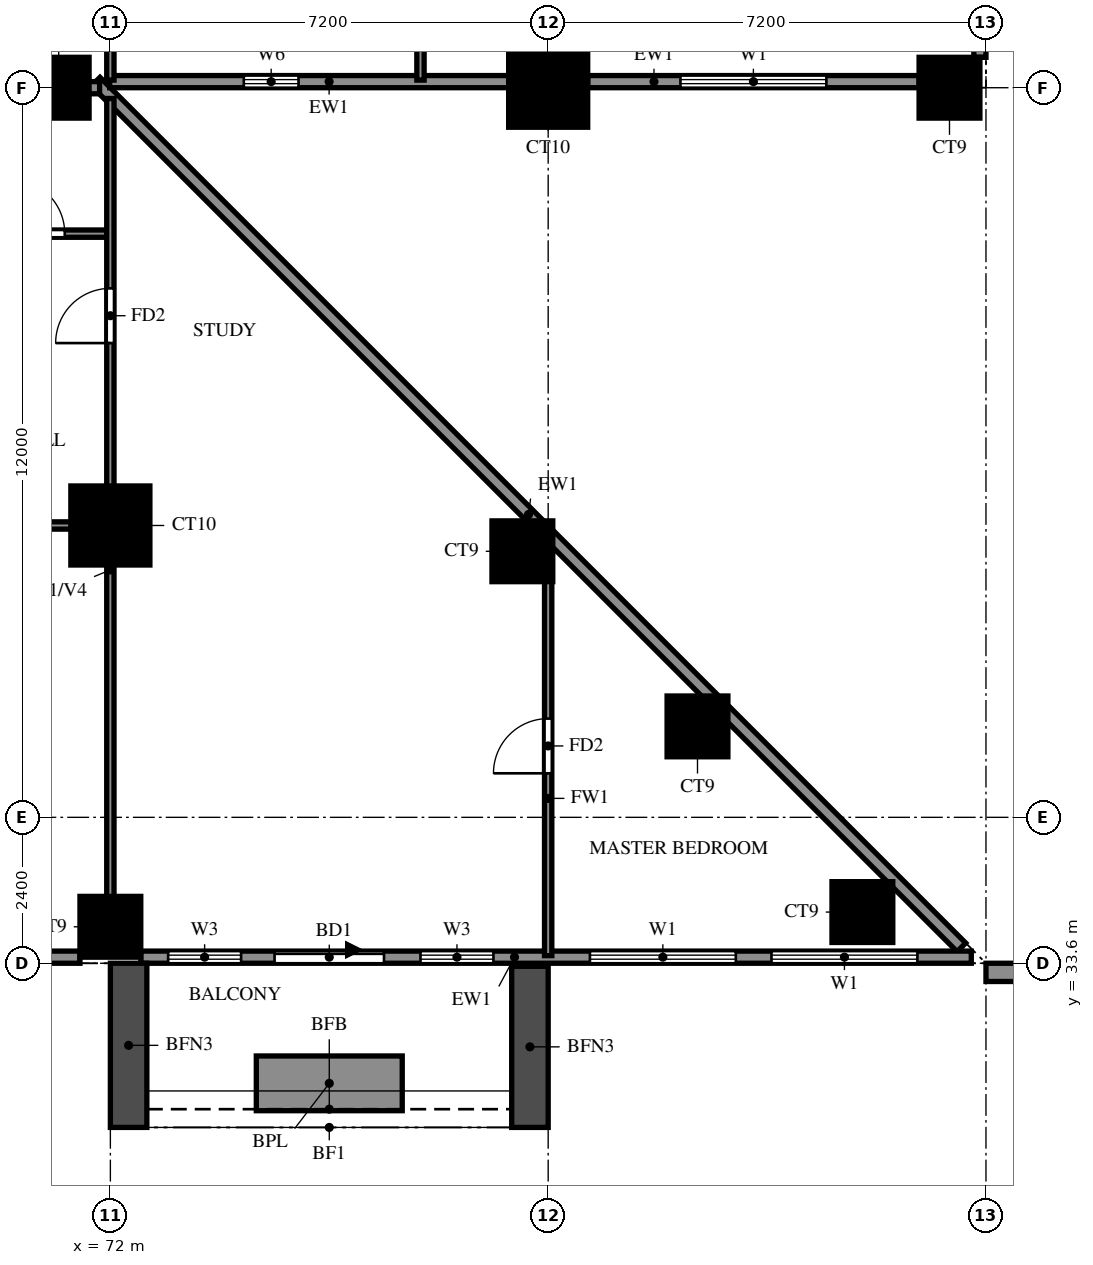
"""IFC4 building model, lengths in metres.
Left out: names, types, materials, properties, quantities, classifications, styles, units other than length and angle.
Written with IfcOpenShell. Run it as: python <this file> out.ifc"""

import sys

from ifc_helpers import new_model, si_unit, direction, frame, frame_2d, origin, origin_2d, place, context, subcontext, project, spatial, rectangle, extrude, source, transform, mapped, element, fill, save


model = new_model("IFC4")
c1 = context("Model", 3, precision=1e-05, world=origin(), true_north=direction((0.0, 1.0)))
c2 = subcontext(c1, "Body", "Model", "MODEL_VIEW")
j1 = project(units=[si_unit("LENGTHUNIT", "METRE"), si_unit("PLANEANGLEUNIT", "RADIAN")], contexts=[c1])
p1 = place(None, origin())
s1 = spatial("IfcSite", under=j1, at=p1, CompositionType="ELEMENT")
p2 = place(p1, origin())
s2 = spatial("IfcBuilding", under=s1, at=p2, CompositionType="ELEMENT")
p3 = place(p2, frame((0.0, 0.0, 83.0)))
s3 = spatial("IfcBuildingStorey", under=s2, at=p3, CompositionType="ELEMENT", Elevation=83.0)
m1 = source(origin(), c2, "Body", "SweptSolid", [
    extrude(rectangle(XDim=1.0, YDim=1.0, at=origin_2d()), origin(), (0.0, 0.0, 1.0), 3.18),
])
for number, where, z_axis, x_axis in (
    (1, (72.0, 34.2, 0.0), (0.0, 0.0, 1.0), (1.0, 0.0, 0.0)),
    (2, (84.367, 34.442, 0.0), (0.0, 0.0, 1.0), (1.0, 0.0, 0.0)),
    (3, (81.656, 37.496, 0.0), (0.0, 0.0, 1.0), (1.0, 0.0, 0.0)),
    (4, (78.776, 40.376, 0.0), (0.0, 0.0, 1.0), (1.0, 0.0, 0.0)),
):
    element("IfcColumn", number, at=place(p3, frame(where, z_axis=z_axis, x_axis=x_axis)), inside=s3, PredefinedType="COLUMN", context=c2, shape_type="MappedRepresentation", body=[
        mapped(m1, transform((0.0, 0.0, 0.0))),
    ])
m2 = source(origin(), c2, "Body", "SweptSolid", [
    extrude(rectangle(XDim=1.3, YDim=1.3, at=origin_2d()), origin(), (0.0, 0.0, 1.0), 3.18),
])
p4 = place(p3, frame((72.0, 40.8, 0.0), z_axis=(0.0, 0.0, 1.0), x_axis=(1.0, 0.0, 0.0)))
e5 = element("IfcColumn", 5, at=p4, inside=s3, PredefinedType="COLUMN", context=c2, shape_type="MappedRepresentation", body=[
    mapped(m2, transform((0.0, 0.0, 0.0))),
])
p5 = place(p3, frame((71.15, 48.0, 0.0), z_axis=(0.0, 0.0, 1.0), x_axis=(1.0, 0.0, 0.0)))
e6 = element("IfcColumn", 6, at=p5, inside=s3, PredefinedType="COLUMN", context=c2, shape_type="MappedRepresentation", body=[
    mapped(m1, transform((0.0, 0.0, 0.0))),
])
p6 = place(p3, frame((79.2, 48.0, 0.0), z_axis=(0.0, 0.0, 1.0), x_axis=(1.0, 0.0, 0.0)))
e7 = element("IfcColumn", 7, at=p6, inside=s3, PredefinedType="COLUMN", context=c2, shape_type="MappedRepresentation", body=[
    mapped(m2, transform((0.0, 0.0, 0.0))),
])
p7 = place(p3, frame((85.8, 48.0, 0.0), z_axis=(0.0, 0.0, 1.0), x_axis=(1.0, 0.0, 0.0)))
e8 = element("IfcColumn", 8, at=p7, inside=s3, PredefinedType="COLUMN", context=c2, shape_type="MappedRepresentation", body=[
    mapped(m1, transform((0.0, 0.0, 0.0))),
])
p8 = place(p3, frame((85.996, 33.863, 0.0), z_axis=(0.0, 0.0, 1.0), x_axis=(-0.707100718496, 0.707112843825, 0.0)))
e9 = element("IfcWall", 9, at=p8, inside=s3, PredefinedType="SOLIDWALL", context=c2, shape_type="SweptSolid", body=[
    extrude(rectangle(XDim=20.135, YDim=0.2, at=frame_2d((10.067, 0.0))), origin(), (0.0, 0.0, 1.0), 3.18),
])
p9 = place(p3, frame((71.989, 48.1, 0.0), z_axis=(0.0, 0.0, 1.0), x_axis=(1.0, 0.0, 0.0)))
e10 = element("IfcWall", 10, at=p9, inside=s3, PredefinedType="SOLIDWALL", context=c2, shape_type="SweptSolid", body=[
    extrude(rectangle(XDim=6.562, YDim=0.2, at=frame_2d((3.281, 0.0))), origin(), (0.0, 0.0, 1.0), 3.18),
])
p10 = place(p9, frame((2.206, 0.0, 1.5)))
e11 = element("IfcOpeningElement", 11, at=p10, cuts=e10, PredefinedType="OPENING", context=c2, shape_type="SweptSolid", body=[
    extrude(rectangle(XDim=0.9, YDim=0.9, at=frame_2d((0.45, 0.45))), frame((0.0, 0.11, 0.0), z_axis=(0.0, -1.0, 0.0), x_axis=(1.0, 0.0, 0.0)), (0.0, 0.0, 1.0), 0.22),
])
p11 = place(p3, frame((79.85, 48.1, 0.0), z_axis=(0.0, 0.0, 1.0), x_axis=(1.0, 0.0, 0.0)))
e12 = element("IfcWall", 12, at=p11, inside=s3, PredefinedType="SOLIDWALL", context=c2, shape_type="SweptSolid", body=[
    extrude(rectangle(XDim=5.45, YDim=0.2, at=frame_2d((2.725, 0.0))), origin(), (0.0, 0.0, 1.0), 3.18),
])
p12 = place(p11, frame((1.525, 0.0, 0.6)))
e13 = element("IfcOpeningElement", 13, at=p12, cuts=e12, PredefinedType="OPENING", context=c2, shape_type="SweptSolid", body=[
    extrude(rectangle(XDim=2.4, YDim=2.4, at=frame_2d((1.2, 1.2))), frame((0.0, 0.11, 0.0), z_axis=(0.0, -1.0, 0.0), x_axis=(1.0, 0.0, 0.0)), (0.0, 0.0, 1.0), 0.22),
])
p13 = place(p3, frame((86.3, 48.5, 0.0), z_axis=(0.0, 0.0, 1.0), x_axis=(0.0, 1.0, 0.0)))
e14 = element("IfcWall", 14, at=p13, inside=s3, PredefinedType="SOLIDWALL", context=c2, shape_type="SweptSolid", body=[
    extrude(rectangle(XDim=6.2, YDim=0.2, at=frame_2d((3.1, 0.0))), origin(), (0.0, 0.0, 1.0), 3.18),
])
p14 = place(p13, frame((1.9, 0.0, 0.6)))
e15 = element("IfcOpeningElement", 15, at=p14, cuts=e14, PredefinedType="OPENING", context=c2, shape_type="SweptSolid", body=[
    extrude(rectangle(XDim=2.4, YDim=2.4, at=frame_2d((1.2, 1.2))), frame((0.0, 0.11, 0.0), z_axis=(0.0, -1.0, 0.0), x_axis=(1.0, 0.0, 0.0)), (0.0, 0.0, 1.0), 0.22),
])
p15 = place(p3, frame((65.3, 33.7, 0.0), z_axis=(0.0, 0.0, 1.0), x_axis=(1.0, 0.0, 0.0)))
e16 = element("IfcWall", 16, at=p15, inside=s3, PredefinedType="SOLIDWALL", context=c2, shape_type="SweptSolid", body=[
    extrude(rectangle(XDim=6.2, YDim=0.2, at=frame_2d((3.1, 0.0))), origin(), (0.0, 0.0, 1.0), 3.18),
])
p16 = place(p15, frame((1.9, 0.0, 0.6)))
e17 = element("IfcOpeningElement", 17, at=p16, cuts=e16, PredefinedType="OPENING", context=c2, shape_type="SweptSolid", body=[
    extrude(rectangle(XDim=2.4, YDim=2.4, at=frame_2d((1.2, 1.2))), frame((0.0, 0.11, 0.0), z_axis=(0.0, -1.0, 0.0), x_axis=(1.0, 0.0, 0.0)), (0.0, 0.0, 1.0), 0.22),
])
p17 = place(p3, frame((72.5, 33.7, 0.0), z_axis=(0.0, 0.0, 1.0), x_axis=(1.0, 0.0, 0.0)))
e18 = element("IfcWall", 18, at=p17, inside=s3, PredefinedType="SOLIDWALL", context=c2, shape_type="SweptSolid", body=[
    extrude(rectangle(XDim=13.659, YDim=0.2, at=frame_2d((6.829, 0.0))), origin(), (0.0, 0.0, 1.0), 3.18),
])
p18 = place(p17, frame((2.2, 0.0, 0.0)))
e19 = element("IfcOpeningElement", 19, at=p18, cuts=e18, PredefinedType="OPENING", context=c2, shape_type="SweptSolid", body=[
    extrude(rectangle(XDim=1.8, YDim=2.4, at=frame_2d((0.9, 1.2))), frame((0.0, 0.11, 0.0), z_axis=(0.0, -1.0, 0.0), x_axis=(1.0, 0.0, 0.0)), (0.0, 0.0, 1.0), 0.22),
])
p19 = place(p17, frame((0.45, 0.0, 0.6)))
e20 = element("IfcOpeningElement", 20, at=p19, cuts=e18, PredefinedType="OPENING", context=c2, shape_type="SweptSolid", body=[
    extrude(rectangle(XDim=1.2, YDim=2.4, at=frame_2d((0.6, 1.2))), frame((0.0, 0.11, 0.0), z_axis=(0.0, -1.0, 0.0), x_axis=(1.0, 0.0, 0.0)), (0.0, 0.0, 1.0), 0.22),
])
p20 = place(p17, frame((4.6, 0.0, 0.6)))
e21 = element("IfcOpeningElement", 21, at=p20, cuts=e18, PredefinedType="OPENING", context=c2, shape_type="SweptSolid", body=[
    extrude(rectangle(XDim=1.2, YDim=2.4, at=frame_2d((0.6, 1.2))), frame((0.0, 0.11, 0.0), z_axis=(0.0, -1.0, 0.0), x_axis=(1.0, 0.0, 0.0)), (0.0, 0.0, 1.0), 0.22),
])
p21 = place(p17, frame((7.386, 0.0, 0.6)))
e22 = element("IfcOpeningElement", 22, at=p21, cuts=e18, PredefinedType="OPENING", context=c2, shape_type="SweptSolid", body=[
    extrude(rectangle(XDim=2.4, YDim=2.4, at=frame_2d((1.2, 1.2))), frame((0.0, 0.11, 0.0), z_axis=(0.0, -1.0, 0.0), x_axis=(1.0, 0.0, 0.0)), (0.0, 0.0, 1.0), 0.22),
])
p22 = place(p17, frame((10.372, 0.0, 0.6)))
e23 = element("IfcOpeningElement", 23, at=p22, cuts=e18, PredefinedType="OPENING", context=c2, shape_type="SweptSolid", body=[
    extrude(rectangle(XDim=2.4, YDim=2.4, at=frame_2d((1.2, 1.2))), frame((0.0, 0.11, 0.0), z_axis=(0.0, -1.0, 0.0), x_axis=(1.0, 0.0, 0.0)), (0.0, 0.0, 1.0), 0.22),
])
p23 = place(p3, frame((86.4, 33.45, -0.32), z_axis=(0.0, 0.0, 1.0), x_axis=(1.0, 0.0, 0.0)))
e24 = element("IfcWall", 24, at=p23, inside=s3, PredefinedType="SOLIDWALL", context=c2, shape_type="SweptSolid", body=[
    extrude(rectangle(XDim=2.4, YDim=0.3, at=frame_2d((1.2, 0.0))), origin(), (0.0, 0.0, 1.0), 3.5),
])
p24 = place(p3, frame((72.3, 33.6, 0.0), z_axis=(0.0, 0.0, 1.0), x_axis=(0.0, -1.0, 0.0)))
e25 = element("IfcWall", 25, at=p24, inside=s3, PredefinedType="SOLIDWALL", context=c2, shape_type="SweptSolid", body=[
    extrude(rectangle(XDim=2.7, YDim=0.6, at=frame_2d((1.35, 0.0))), origin(), (0.0, 0.0, 1.0), 2.85),
])
p25 = place(p3, frame((78.9, 33.55, 0.0), z_axis=(0.0, 0.0, 1.0), x_axis=(0.0, -1.0, 0.0)))
e26 = element("IfcWall", 26, at=p25, inside=s3, PredefinedType="SOLIDWALL", context=c2, shape_type="SweptSolid", body=[
    extrude(rectangle(XDim=2.65, YDim=0.6, at=frame_2d((1.325, 0.0))), origin(), (0.0, 0.0, 1.0), 2.85),
])
p26 = place(p3, frame((74.4, 31.625, 0.0), z_axis=(0.0, 0.0, 1.0), x_axis=(1.0, 0.0, 0.0)))
e27 = element("IfcWall", 27, at=p26, inside=s3, PredefinedType="SOLIDWALL", context=c2, shape_type="SweptSolid", body=[
    extrude(rectangle(XDim=2.4, YDim=0.9, at=frame_2d((1.2, 0.0))), origin(), (0.0, 0.0, 1.0), 0.9),
])
p27 = place(p3, frame((67.2, 48.0, 0.0), z_axis=(0.0, 0.0, 1.0), x_axis=(1.0, 0.0, 0.0)))
e28 = element("IfcWall", 28, at=p27, inside=s3, PredefinedType="SOLIDWALL", context=c2, shape_type="SweptSolid", body=[
    extrude(rectangle(XDim=4.623, YDim=0.2, at=frame_2d((2.312, 0.0))), origin(), (0.0, 0.0, 1.0), 3.18),
])
p28 = place(p3, frame((60.0, 40.8, 0.0), z_axis=(0.0, 0.0, 1.0), x_axis=(1.0, 0.0, 0.0)))
e29 = element("IfcWall", 29, at=p28, inside=s3, PredefinedType="PARTITIONING", context=c2, shape_type="SweptSolid", body=[
    extrude(rectangle(XDim=12.0, YDim=0.12, at=frame_2d((6.0, 0.0))), origin(), (0.0, 0.0, 1.0), 3.18),
])
p29 = place(p28, frame((7.65, 0.0, 0.0)))
e30 = element("IfcOpeningElement", 30, at=p29, cuts=e29, PredefinedType="OPENING", context=c2, shape_type="SweptSolid", body=[
    extrude(rectangle(XDim=1.5, YDim=2.1, at=frame_2d((0.75, 1.05))), frame((0.0, 0.07, 0.0), z_axis=(0.0, -1.0, 0.0), x_axis=(1.0, 0.0, 0.0)), (0.0, 0.0, 1.0), 0.14),
])
p30 = place(p28, frame((1.95, 0.0, 0.0)))
e31 = element("IfcOpeningElement", 31, at=p30, cuts=e29, PredefinedType="OPENING", context=c2, shape_type="SweptSolid", body=[
    extrude(rectangle(XDim=0.9, YDim=2.1, at=frame_2d((0.45, 1.05))), frame((0.0, 0.07, 0.0), z_axis=(0.0, -1.0, 0.0), x_axis=(1.0, 0.0, 0.0)), (0.0, 0.0, 1.0), 0.14),
])
p31 = place(p3, frame((67.2, 45.6, 0.0), z_axis=(0.0, 0.0, 1.0), x_axis=(1.0, 0.0, 0.0)))
e32 = element("IfcWall", 32, at=p31, inside=s3, PredefinedType="PARTITIONING", context=c2, shape_type="SweptSolid", body=[
    extrude(rectangle(XDim=4.8, YDim=0.12, at=frame_2d((2.4, 0.0))), origin(), (0.0, 0.0, 1.0), 3.18),
])
p32 = place(p31, frame((3.15, 0.0, 0.0)))
e33 = element("IfcOpeningElement", 33, at=p32, cuts=e32, PredefinedType="OPENING", context=c2, shape_type="SweptSolid", body=[
    extrude(rectangle(XDim=0.9, YDim=2.1, at=frame_2d((0.45, 1.05))), frame((0.0, 0.07, 0.0), z_axis=(0.0, -1.0, 0.0), x_axis=(1.0, 0.0, 0.0)), (0.0, 0.0, 1.0), 0.14),
])
p33 = place(p3, frame((72.0, 33.725, 0.0), z_axis=(0.0, 0.0, 1.0), x_axis=(0.0, 1.0, 0.0)))
e34 = element("IfcWall", 34, at=p33, inside=s3, PredefinedType="PARTITIONING", context=c2, shape_type="SweptSolid", body=[
    extrude(rectangle(XDim=14.098, YDim=0.12, at=frame_2d((7.049, 0.0))), origin(), (0.0, 0.0, 1.0), 2.28),
])
p34 = place(p33, frame((10.075, 0.0, 0.0)))
e35 = element("IfcOpeningElement", 35, at=p34, cuts=e34, PredefinedType="OPENING", context=c2, shape_type="SweptSolid", body=[
    extrude(rectangle(XDim=0.9, YDim=2.1, at=frame_2d((0.45, 1.05))), frame((0.0, 0.07, 0.0), z_axis=(0.0, -1.0, 0.0), x_axis=(1.0, 0.0, 0.0)), (0.0, 0.0, 1.0), 0.14),
])
for number, where, z_axis, x_axis in (
    (36, (72.0, 48.125, 0.0), (0.0, 0.0, 1.0), (0.0, 1.0, 0.0)),
    (37, (77.1, 48.125, 0.0), (0.0, 0.0, 1.0), (0.0, 1.0, 0.0)),
):
    element("IfcWall", number, at=place(p3, frame(where, z_axis=z_axis, x_axis=x_axis)), inside=s3, PredefinedType="PARTITIONING", context=c2, shape_type="SweptSolid", body=[
        extrude(rectangle(XDim=3.475, YDim=0.12, at=frame_2d((1.738, 0.0))), origin(), (0.0, 0.0, 1.0), 3.18),
    ])
p35 = place(p3, frame((79.2, 33.725, 0.0), z_axis=(0.0, 0.0, 1.0), x_axis=(0.0, 1.0, 0.0)))
e38 = element("IfcWall", 38, at=p35, inside=s3, PredefinedType="PARTITIONING", context=c2, shape_type="SweptSolid", body=[
    extrude(rectangle(XDim=6.898, YDim=0.12, at=frame_2d((3.449, 0.0))), origin(), (0.0, 0.0, 1.0), 3.18),
])
p36 = place(p35, frame((2.999, 0.0, 0.0)))
e39 = element("IfcOpeningElement", 39, at=p36, cuts=e38, PredefinedType="OPENING", context=c2, shape_type="SweptSolid", body=[
    extrude(rectangle(XDim=0.9, YDim=2.1, at=frame_2d((0.45, 1.05))), frame((0.0, 0.07, 0.0), z_axis=(0.0, -1.0, 0.0), x_axis=(1.0, 0.0, 0.0)), (0.0, 0.0, 1.0), 0.14),
])
p37 = place(p3, frame((79.2, 48.125, 0.0), z_axis=(0.0, 0.0, 1.0), x_axis=(0.0, 1.0, 0.0)))
e40 = element("IfcWall", 40, at=p37, inside=s3, PredefinedType="PARTITIONING", context=c2, shape_type="SweptSolid", body=[
    extrude(rectangle(XDim=21.475, YDim=0.12, at=frame_2d((10.738, 0.0))), origin(), (0.0, 0.0, 1.0), 3.18),
])
p38 = place(p37, frame((2.788, 0.0, 0.0)))
e41 = element("IfcOpeningElement", 41, at=p38, cuts=e40, PredefinedType="OPENING", context=c2, shape_type="SweptSolid", body=[
    extrude(rectangle(XDim=1.5, YDim=2.1, at=frame_2d((0.75, 1.05))), frame((0.0, 0.07, 0.0), z_axis=(0.0, -1.0, 0.0), x_axis=(1.0, 0.0, 0.0)), (0.0, 0.0, 1.0), 0.14),
])
p39 = place(p37, frame((8.425, 0.0, 0.0)))
e42 = element("IfcOpeningElement", 42, at=p39, cuts=e40, PredefinedType="OPENING", context=c2, shape_type="SweptSolid", body=[
    extrude(rectangle(XDim=0.9, YDim=2.1, at=frame_2d((0.45, 1.05))), frame((0.0, 0.07, 0.0), z_axis=(0.0, -1.0, 0.0), x_axis=(1.0, 0.0, 0.0)), (0.0, 0.0, 1.0), 0.14),
])
p40 = place(p37, frame((12.025, 0.0, 0.0)))
e43 = element("IfcOpeningElement", 43, at=p40, cuts=e40, PredefinedType="OPENING", context=c2, shape_type="SweptSolid", body=[
    extrude(rectangle(XDim=0.9, YDim=2.1, at=frame_2d((0.45, 1.05))), frame((0.0, 0.07, 0.0), z_axis=(0.0, -1.0, 0.0), x_axis=(1.0, 0.0, 0.0)), (0.0, 0.0, 1.0), 0.14),
])
p41 = place(p37, frame((17.425, 0.0, 0.0)))
e44 = element("IfcOpeningElement", 44, at=p41, cuts=e40, PredefinedType="OPENING", context=c2, shape_type="SweptSolid", body=[
    extrude(rectangle(XDim=0.9, YDim=2.1, at=frame_2d((0.45, 1.05))), frame((0.0, 0.07, 0.0), z_axis=(0.0, -1.0, 0.0), x_axis=(1.0, 0.0, 0.0)), (0.0, 0.0, 1.0), 0.14),
])
p42 = place(p10, origin())
e45 = element("IfcWindow", 45, at=p42, inside=s3, PartitioningType="SINGLE_PANEL", PredefinedType="WINDOW", context=c2, shape_type="SweptSolid", body=[
    extrude(rectangle(XDim=0.9, YDim=0.9, at=frame_2d((0.45, 0.45))), frame((0.0, 0.03, 0.0), z_axis=(0.0, -1.0, 0.0), x_axis=(1.0, 0.0, 0.0)), (0.0, 0.0, 1.0), 0.06),
])
fill(e11, e45)
p43 = place(p12, origin())
e46 = element("IfcWindow", 46, at=p43, inside=s3, PartitioningType="DOUBLE_PANEL_VERTICAL", PredefinedType="WINDOW", context=c2, shape_type="SweptSolid", body=[
    extrude(rectangle(XDim=2.4, YDim=2.4, at=frame_2d((1.2, 1.2))), frame((0.0, 0.03, 0.0), z_axis=(0.0, -1.0, 0.0), x_axis=(1.0, 0.0, 0.0)), (0.0, 0.0, 1.0), 0.06),
])
fill(e13, e46)
p44 = place(p18, origin())
e47 = element("IfcDoor", 47, at=p44, inside=s3, OperationType="DOUBLE_DOOR_SLIDING", PredefinedType="DOOR", context=c2, shape_type="SweptSolid", body=[
    extrude(rectangle(XDim=1.8, YDim=2.4, at=frame_2d((0.9, 1.2))), frame((0.0, 0.025, 0.0), z_axis=(0.0, -1.0, 0.0), x_axis=(1.0, 0.0, 0.0)), (0.0, 0.0, 1.0), 0.05),
])
fill(e19, e47)
p45 = place(p19, origin())
e48 = element("IfcWindow", 48, at=p45, inside=s3, PartitioningType="SINGLE_PANEL", PredefinedType="WINDOW", context=c2, shape_type="SweptSolid", body=[
    extrude(rectangle(XDim=1.2, YDim=2.4, at=frame_2d((0.6, 1.2))), frame((0.0, 0.03, 0.0), z_axis=(0.0, -1.0, 0.0), x_axis=(1.0, 0.0, 0.0)), (0.0, 0.0, 1.0), 0.06),
])
fill(e20, e48)
p46 = place(p20, origin())
e49 = element("IfcWindow", 49, at=p46, inside=s3, PartitioningType="SINGLE_PANEL", PredefinedType="WINDOW", context=c2, shape_type="SweptSolid", body=[
    extrude(rectangle(XDim=1.2, YDim=2.4, at=frame_2d((0.6, 1.2))), frame((0.0, 0.03, 0.0), z_axis=(0.0, -1.0, 0.0), x_axis=(1.0, 0.0, 0.0)), (0.0, 0.0, 1.0), 0.06),
])
fill(e21, e49)
p47 = place(p21, origin())
e50 = element("IfcWindow", 50, at=p47, inside=s3, PartitioningType="DOUBLE_PANEL_VERTICAL", PredefinedType="WINDOW", context=c2, shape_type="SweptSolid", body=[
    extrude(rectangle(XDim=2.4, YDim=2.4, at=frame_2d((1.2, 1.2))), frame((0.0, 0.03, 0.0), z_axis=(0.0, -1.0, 0.0), x_axis=(1.0, 0.0, 0.0)), (0.0, 0.0, 1.0), 0.06),
])
fill(e22, e50)
p48 = place(p22, origin())
e51 = element("IfcWindow", 51, at=p48, inside=s3, PartitioningType="DOUBLE_PANEL_VERTICAL", PredefinedType="WINDOW", context=c2, shape_type="SweptSolid", body=[
    extrude(rectangle(XDim=2.4, YDim=2.4, at=frame_2d((1.2, 1.2))), frame((0.0, 0.03, 0.0), z_axis=(0.0, -1.0, 0.0), x_axis=(1.0, 0.0, 0.0)), (0.0, 0.0, 1.0), 0.06),
])
fill(e23, e51)
p49 = place(p32, origin())
e52 = element("IfcDoor", 52, at=p49, inside=s3, OperationType="SINGLE_SWING_LEFT", PredefinedType="DOOR", context=c2, shape_type="SweptSolid", body=[
    extrude(rectangle(XDim=0.9, YDim=2.1, at=frame_2d((0.45, 1.05))), frame((0.0, 0.025, 0.0), z_axis=(0.0, -1.0, 0.0), x_axis=(1.0, 0.0, 0.0)), (0.0, 0.0, 1.0), 0.05),
])
fill(e33, e52)
p50 = place(p34, origin())
e53 = element("IfcDoor", 53, at=p50, inside=s3, OperationType="SINGLE_SWING_RIGHT", PredefinedType="DOOR", context=c2, shape_type="SweptSolid", body=[
    extrude(rectangle(XDim=0.9, YDim=2.1, at=frame_2d((0.45, 1.05))), frame((0.0, 0.025, 0.0), z_axis=(0.0, -1.0, 0.0), x_axis=(1.0, 0.0, 0.0)), (0.0, 0.0, 1.0), 0.05),
])
fill(e35, e53)
p51 = place(p36, origin())
e54 = element("IfcDoor", 54, at=p51, inside=s3, OperationType="SINGLE_SWING_LEFT", PredefinedType="DOOR", context=c2, shape_type="SweptSolid", body=[
    extrude(rectangle(XDim=0.9, YDim=2.1, at=frame_2d((0.45, 1.05))), frame((0.0, 0.025, 0.0), z_axis=(0.0, -1.0, 0.0), x_axis=(1.0, 0.0, 0.0)), (0.0, 0.0, 1.0), 0.05),
])
fill(e39, e54)
save(model, sys.argv[1])
